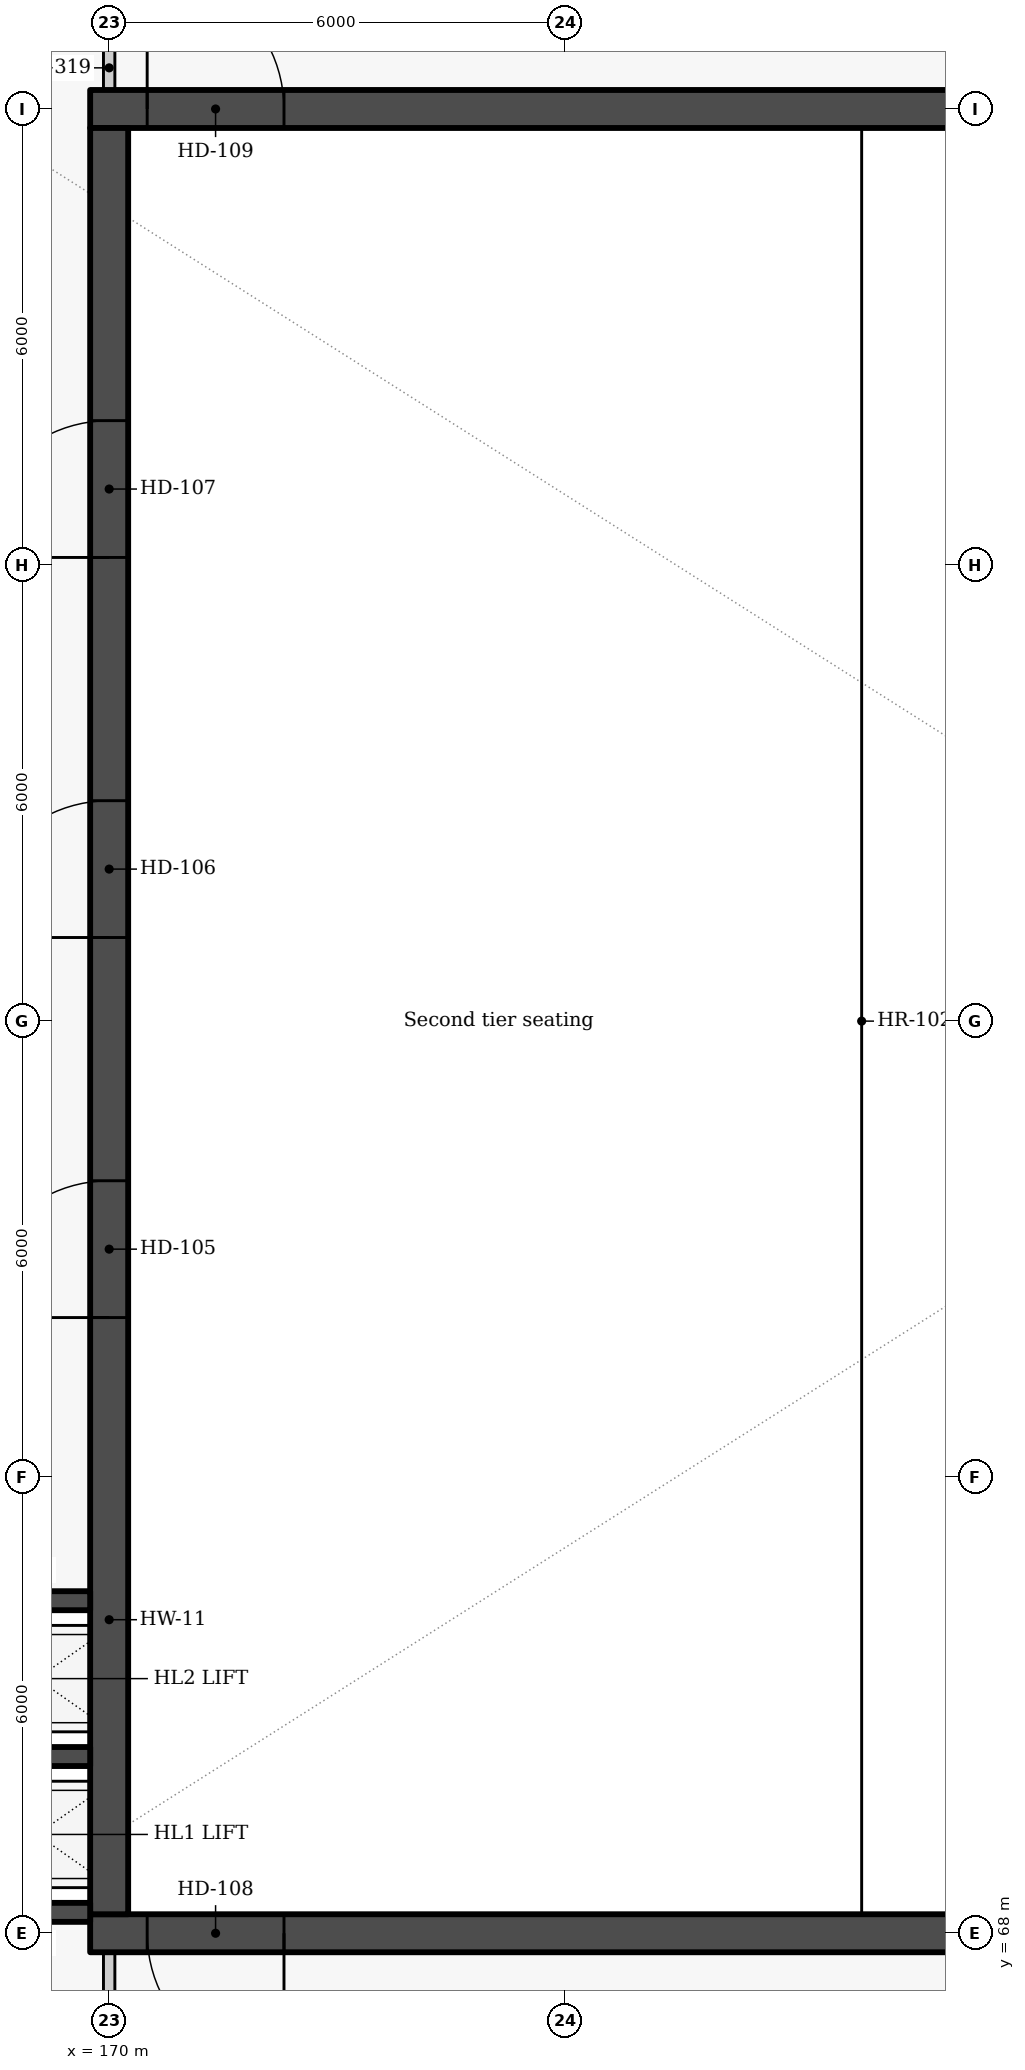
"""IFC4 building model, lengths in metres.
Left out: names, types, materials, properties, quantities, classifications, styles, units other than length and angle.
Written with IfcOpenShell. Run it as: python <this file> out.ifc"""

import sys

from ifc_helpers import new_model, si_unit, direction, frame, frame_2d, origin, place, context, subcontext, project, spatial, rectangle, extrude, element, fill, save


model = new_model("IFC4")
c1 = context("Model", 3, precision=1e-05, world=origin(), true_north=direction((0.0, 1.0)))
c2 = subcontext(c1, "Body", "Model", "MODEL_VIEW")
j1 = project(units=[si_unit("LENGTHUNIT", "METRE"), si_unit("PLANEANGLEUNIT", "RADIAN")], contexts=[c1])
p1 = place(None, origin())
s1 = spatial("IfcSite", under=j1, at=p1, CompositionType="ELEMENT")
p2 = place(p1, origin())
s2 = spatial("IfcBuilding", under=s1, at=p2, CompositionType="ELEMENT")
p3 = place(p2, frame((0.0, 0.0, 11.4)))
s3 = spatial("IfcBuildingStorey", under=s2, at=p3, CompositionType="ELEMENT", Elevation=11.4)
p4 = place(p3, frame((206.25, 68.0, 0.0), z_axis=(0.0, 0.0, 1.0), x_axis=(-1.0, 0.0, 0.0)))
e1 = element("IfcWall", 1, at=p4, inside=s3, PredefinedType="SHEAR", context=c2, shape_type="SweptSolid", body=[
    extrude(rectangle(XDim=36.5, YDim=0.5, at=frame_2d((18.25, 0.0))), origin(), (0.0, 0.0, 1.0), 4.2),
])
p5 = place(p4, frame((33.95, 0.0, 0.0)))
e2 = element("IfcOpeningElement", 2, at=p5, cuts=e1, PredefinedType="OPENING", context=c2, shape_type="SweptSolid", body=[
    extrude(rectangle(XDim=1.8, YDim=2.4, at=frame_2d((0.9, 1.2))), frame((0.0, 0.26, 0.0), z_axis=(0.0, -1.0, 0.0), x_axis=(1.0, 0.0, 0.0)), (0.0, 0.0, 1.0), 0.52),
])
p6 = place(p3, frame((169.75, 92.0, 0.0), z_axis=(0.0, 0.0, 1.0), x_axis=(1.0, 0.0, 0.0)))
e3 = element("IfcWall", 3, at=p6, inside=s3, PredefinedType="SHEAR", context=c2, shape_type="SweptSolid", body=[
    extrude(rectangle(XDim=36.5, YDim=0.5, at=frame_2d((18.25, 0.0))), origin(), (0.0, 0.0, 1.0), 4.2),
])
p7 = place(p6, frame((0.75, 0.0, 0.0)))
e4 = element("IfcOpeningElement", 4, at=p7, cuts=e3, PredefinedType="OPENING", context=c2, shape_type="SweptSolid", body=[
    extrude(rectangle(XDim=1.8, YDim=2.4, at=frame_2d((0.9, 1.2))), frame((0.0, 0.26, 0.0), z_axis=(0.0, -1.0, 0.0), x_axis=(1.0, 0.0, 0.0)), (0.0, 0.0, 1.0), 0.52),
])
p8 = place(p3, frame((170.0, 68.25, 0.0), z_axis=(0.0, 0.0, 1.0), x_axis=(0.0, 1.0, 0.0)))
e5 = element("IfcWall", 5, at=p8, inside=s3, PredefinedType="SHEAR", context=c2, shape_type="SweptSolid", body=[
    extrude(rectangle(XDim=23.5, YDim=0.5, at=frame_2d((11.75, 0.0))), origin(), (0.0, 0.0, 1.0), 4.2),
])
p9 = place(p8, frame((7.85, 0.0, 0.0)))
e6 = element("IfcOpeningElement", 6, at=p9, cuts=e5, PredefinedType="OPENING", context=c2, shape_type="SweptSolid", body=[
    extrude(rectangle(XDim=1.8, YDim=2.4, at=frame_2d((0.9, 1.2))), frame((0.0, 0.26, 0.0), z_axis=(0.0, -1.0, 0.0), x_axis=(1.0, 0.0, 0.0)), (0.0, 0.0, 1.0), 0.52),
])
p10 = place(p8, frame((12.85, 0.0, 0.0)))
e7 = element("IfcOpeningElement", 7, at=p10, cuts=e5, PredefinedType="OPENING", context=c2, shape_type="SweptSolid", body=[
    extrude(rectangle(XDim=1.8, YDim=2.4, at=frame_2d((0.9, 1.2))), frame((0.0, 0.26, 0.0), z_axis=(0.0, -1.0, 0.0), x_axis=(1.0, 0.0, 0.0)), (0.0, 0.0, 1.0), 0.52),
])
p11 = place(p8, frame((17.85, 0.0, 0.0)))
e8 = element("IfcOpeningElement", 8, at=p11, cuts=e5, PredefinedType="OPENING", context=c2, shape_type="SweptSolid", body=[
    extrude(rectangle(XDim=1.8, YDim=2.4, at=frame_2d((0.9, 1.2))), frame((0.0, 0.26, 0.0), z_axis=(0.0, -1.0, 0.0), x_axis=(1.0, 0.0, 0.0)), (0.0, 0.0, 1.0), 0.52),
])
for number, where, z_axis, x_axis in (
    (9, (167.725, 70.325, 0.0), (0.0, 0.0, 1.0), (1.0, 0.0, 0.0)),
    (10, (169.75, 72.375, 0.0), (0.0, 0.0, 1.0), (-1.0, 0.0, 0.0)),
    (11, (167.725, 68.275, 0.0), (0.0, 0.0, 1.0), (1.0, 0.0, 0.0)),
):
    element("IfcWall", number, at=place(p3, frame(where, z_axis=z_axis, x_axis=x_axis)), inside=s3, PredefinedType="SOLIDWALL", context=c2, shape_type="SweptSolid", body=[
        extrude(rectangle(XDim=2.025, YDim=0.25, at=frame_2d((1.012, 0.0))), origin(), (0.0, 0.0, 1.0), 4.2),
    ])
p12 = place(p3, frame((170.0, 67.75, 0.0), z_axis=(0.0, 0.0, 1.0), x_axis=(0.0, -1.0, 0.0)))
e12 = element("IfcWall", 12, at=p12, inside=s3, PredefinedType="PARTITIONING", context=c2, shape_type="SweptSolid", body=[
    extrude(rectangle(XDim=2.965, YDim=0.15, at=frame_2d((1.482, 0.0))), origin(), (0.0, 0.0, 1.0), 3.85),
])
p13 = place(p12, frame((0.683, 0.0, 0.0)))
e13 = element("IfcOpeningElement", 13, at=p13, cuts=e12, PredefinedType="OPENING", context=c2, shape_type="SweptSolid", body=[
    extrude(rectangle(XDim=1.6, YDim=2.1, at=frame_2d((0.8, 1.05))), frame((0.0, 0.085, 0.0), z_axis=(0.0, -1.0, 0.0), x_axis=(1.0, 0.0, 0.0)), (0.0, 0.0, 1.0), 0.17),
])
p14 = place(p3, frame((170.0, 95.215, 0.0), z_axis=(0.0, 0.0, 1.0), x_axis=(0.0, -1.0, 0.0)))
e14 = element("IfcWall", 14, at=p14, inside=s3, PredefinedType="PARTITIONING", context=c2, shape_type="SweptSolid", body=[
    extrude(rectangle(XDim=2.965, YDim=0.15, at=frame_2d((1.482, 0.0))), origin(), (0.0, 0.0, 1.0), 3.85),
])
p15 = place(p14, frame((0.683, 0.0, 0.0)))
e15 = element("IfcOpeningElement", 15, at=p15, cuts=e14, PredefinedType="OPENING", context=c2, shape_type="SweptSolid", body=[
    extrude(rectangle(XDim=1.6, YDim=2.1, at=frame_2d((0.8, 1.05))), frame((0.0, 0.085, 0.0), z_axis=(0.0, -1.0, 0.0), x_axis=(1.0, 0.0, 0.0)), (0.0, 0.0, 1.0), 0.17),
])
p16 = place(p9, origin())
e16 = element("IfcDoor", 16, at=p16, inside=s3, OperationType="DOUBLE_DOOR_SINGLE_SWING", PredefinedType="DOOR", context=c2, shape_type="SweptSolid", body=[
    extrude(rectangle(XDim=1.8, YDim=2.4, at=frame_2d((0.9, 1.2))), frame((0.0, 0.025, 0.0), z_axis=(0.0, -1.0, 0.0), x_axis=(1.0, 0.0, 0.0)), (0.0, 0.0, 1.0), 0.05),
])
fill(e6, e16)
p17 = place(p10, origin())
e17 = element("IfcDoor", 17, at=p17, inside=s3, OperationType="DOUBLE_DOOR_SINGLE_SWING", PredefinedType="DOOR", context=c2, shape_type="SweptSolid", body=[
    extrude(rectangle(XDim=1.8, YDim=2.4, at=frame_2d((0.9, 1.2))), frame((0.0, 0.025, 0.0), z_axis=(0.0, -1.0, 0.0), x_axis=(1.0, 0.0, 0.0)), (0.0, 0.0, 1.0), 0.05),
])
fill(e7, e17)
p18 = place(p11, origin())
e18 = element("IfcDoor", 18, at=p18, inside=s3, OperationType="DOUBLE_DOOR_SINGLE_SWING", PredefinedType="DOOR", context=c2, shape_type="SweptSolid", body=[
    extrude(rectangle(XDim=1.8, YDim=2.4, at=frame_2d((0.9, 1.2))), frame((0.0, 0.025, 0.0), z_axis=(0.0, -1.0, 0.0), x_axis=(1.0, 0.0, 0.0)), (0.0, 0.0, 1.0), 0.05),
])
fill(e8, e18)
p19 = place(p5, origin())
e19 = element("IfcDoor", 19, at=p19, inside=s3, OperationType="DOUBLE_DOOR_SINGLE_SWING", PredefinedType="DOOR", context=c2, shape_type="SweptSolid", body=[
    extrude(rectangle(XDim=1.8, YDim=2.4, at=frame_2d((0.9, 1.2))), frame((0.0, 0.025, 0.0), z_axis=(0.0, -1.0, 0.0), x_axis=(1.0, 0.0, 0.0)), (0.0, 0.0, 1.0), 0.05),
])
fill(e2, e19)
p20 = place(p7, origin())
e20 = element("IfcDoor", 20, at=p20, inside=s3, OperationType="DOUBLE_DOOR_SINGLE_SWING", PredefinedType="DOOR", context=c2, shape_type="SweptSolid", body=[
    extrude(rectangle(XDim=1.8, YDim=2.4, at=frame_2d((0.9, 1.2))), frame((0.0, 0.025, 0.0), z_axis=(0.0, -1.0, 0.0), x_axis=(1.0, 0.0, 0.0)), (0.0, 0.0, 1.0), 0.05),
])
fill(e4, e20)
save(model, sys.argv[1])
